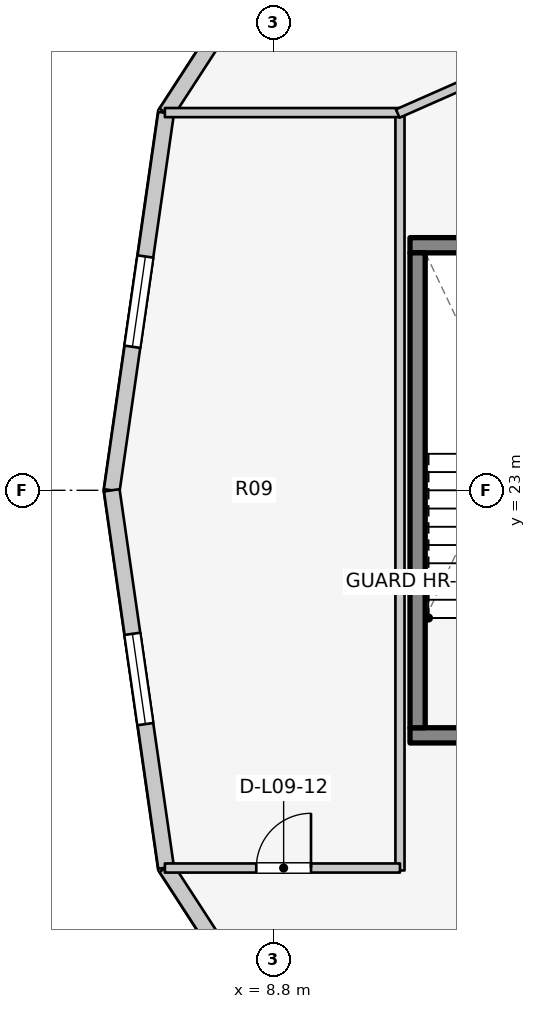
"""IFC4 building model, lengths in metres.
Left out: names, types, materials, properties, quantities, classifications, styles, units other than length and angle.
Written with IfcOpenShell. Run it as: python <this file> out.ifc"""

import sys

from ifc_helpers import new_model, si_unit, direction, frame, frame_2d, origin, place, context, subcontext, project, spatial, rectangle, extrude, element, fill, save


model = new_model("IFC4")
c1 = context("Model", 3, precision=1e-05, world=origin(), true_north=direction((0.0, 1.0)))
c2 = subcontext(c1, "Body", "Model", "MODEL_VIEW")
j1 = project(units=[si_unit("LENGTHUNIT", "METRE"), si_unit("PLANEANGLEUNIT", "RADIAN")], contexts=[c1])
p1 = place(None, origin())
s1 = spatial("IfcSite", under=j1, at=p1, CompositionType="ELEMENT")
p2 = place(p1, origin())
s2 = spatial("IfcBuilding", under=s1, at=p2, CompositionType="ELEMENT")
p3 = place(p2, frame((0.0, 0.0, 33.8)))
s3 = spatial("IfcBuildingStorey", under=s2, at=p3, CompositionType="ELEMENT", Elevation=33.8)
p4 = place(p3, frame((11.045, 18.97, 0.0), z_axis=(0.0, 0.0, 1.0), x_axis=(1.0, 0.0, 0.0)))
e1 = element("IfcWall", 1, at=p4, inside=s3, PredefinedType="SOLIDWALL", context=c2, shape_type="SweptSolid", body=[
    extrude(rectangle(XDim=3.782, YDim=0.25, at=frame_2d((1.891, 0.0))), origin(), (0.0, 0.0, 1.0), 3.1),
])
p5 = place(p4, frame((1.135, 0.0, 0.0)))
e2 = element("IfcOpeningElement", 2, at=p5, cuts=e1, PredefinedType="OPENING", context=c2, shape_type="SweptSolid", body=[
    extrude(rectangle(XDim=1.1, YDim=2.1, at=frame_2d((0.55, 1.05))), frame((0.0, 0.135, 0.0), z_axis=(0.0, -1.0, 0.0), x_axis=(1.0, 0.0, 0.0)), (0.0, 0.0, 1.0), 0.27),
])
p6 = place(p3, frame((11.045, 27.03, 0.0), z_axis=(0.0, 0.0, 1.0), x_axis=(1.0, 0.0, 0.0)))
e3 = element("IfcWall", 3, at=p6, inside=s3, PredefinedType="SOLIDWALL", context=c2, shape_type="SweptSolid", body=[
    extrude(rectangle(XDim=3.782, YDim=0.25, at=frame_2d((1.891, 0.0))), origin(), (0.0, 0.0, 1.0), 3.1),
])
p7 = place(p3, frame((11.17, 19.095, 0.0), z_axis=(0.0, 0.0, 1.0), x_axis=(0.0, 1.0, 0.0)))
e4 = element("IfcWall", 4, at=p7, inside=s3, PredefinedType="SOLIDWALL", context=c2, shape_type="SweptSolid", body=[
    extrude(rectangle(XDim=7.81, YDim=0.25, at=frame_2d((3.905, 0.0))), origin(), (0.0, 0.0, 1.0), 3.1),
])
p8 = place(p3, frame((9.806, 33.476, 0.0), z_axis=(0.0, 0.0, 1.0), x_axis=(-0.544578722263, -0.838709732421, 0.0)))
e5 = element("IfcWall", 5, at=p8, inside=s3, PredefinedType="STANDARD", context=c2, shape_type="SweptSolid", body=[
    extrude(rectangle(XDim=5.092, YDim=0.26, at=frame_2d((2.546, 0.0))), origin(), (0.0, 0.0, 1.0), 1.22),
])
p9 = place(p8, frame((1.946, 0.0, 0.15)))
e6 = element("IfcOpeningElement", 6, at=p9, cuts=e5, PredefinedType="OPENING", context=c2, shape_type="SweptSolid", body=[
    extrude(rectangle(XDim=1.2, YDim=0.9, at=frame_2d((0.6, 0.45))), frame((0.0, 0.14, 0.0), z_axis=(0.0, -1.0, 0.0), x_axis=(1.0, 0.0, 0.0)), (0.0, 0.0, 1.0), 0.28),
])
p10 = place(p3, frame((7.033, 29.205, 0.0), z_axis=(0.0, 0.0, 1.0), x_axis=(-0.142528001686, -0.989790770181, 0.0)))
e7 = element("IfcWall", 7, at=p10, inside=s3, PredefinedType="STANDARD", context=c2, shape_type="SweptSolid", body=[
    extrude(rectangle(XDim=6.269, YDim=0.26, at=frame_2d((3.135, 0.0))), origin(), (0.0, 0.0, 1.0), 2.57),
])
p11 = place(p10, frame((2.385, 0.0, 0.75)))
e8 = element("IfcOpeningElement", 8, at=p11, cuts=e7, PredefinedType="OPENING", context=c2, shape_type="SweptSolid", body=[
    extrude(rectangle(XDim=1.5, YDim=1.6, at=frame_2d((0.75, 0.8))), frame((0.0, 0.14, 0.0), z_axis=(0.0, -1.0, 0.0), x_axis=(1.0, 0.0, 0.0)), (0.0, 0.0, 1.0), 0.28),
])
p12 = place(p3, frame((6.14, 23.0, 0.0), z_axis=(0.0, 0.0, 1.0), x_axis=(0.142528001686, -0.989790770181, 0.0)))
e9 = element("IfcWall", 9, at=p12, inside=s3, PredefinedType="STANDARD", context=c2, shape_type="SweptSolid", body=[
    extrude(rectangle(XDim=6.269, YDim=0.26, at=frame_2d((3.135, 0.0))), origin(), (0.0, 0.0, 1.0), 2.57),
])
p13 = place(p12, frame((2.385, 0.0, 0.75)))
e10 = element("IfcOpeningElement", 10, at=p13, cuts=e9, PredefinedType="OPENING", context=c2, shape_type="SweptSolid", body=[
    extrude(rectangle(XDim=1.5, YDim=1.6, at=frame_2d((0.75, 0.8))), frame((0.0, 0.14, 0.0), z_axis=(0.0, -1.0, 0.0), x_axis=(1.0, 0.0, 0.0)), (0.0, 0.0, 1.0), 0.28),
])
p14 = place(p3, frame((7.033, 16.795, 0.0), z_axis=(0.0, 0.0, 1.0), x_axis=(0.544578722263, -0.838709732421, 0.0)))
e11 = element("IfcWall", 11, at=p14, inside=s3, PredefinedType="STANDARD", context=c2, shape_type="SweptSolid", body=[
    extrude(rectangle(XDim=5.092, YDim=0.26, at=frame_2d((2.546, 0.0))), origin(), (0.0, 0.0, 1.0), 1.22),
])
p15 = place(p14, frame((1.946, 0.0, 0.15)))
e12 = element("IfcOpeningElement", 12, at=p15, cuts=e11, PredefinedType="OPENING", context=c2, shape_type="SweptSolid", body=[
    extrude(rectangle(XDim=1.2, YDim=0.9, at=frame_2d((0.6, 0.45))), frame((0.0, 0.14, 0.0), z_axis=(0.0, -1.0, 0.0), x_axis=(1.0, 0.0, 0.0)), (0.0, 0.0, 1.0), 0.28),
])
p16 = place(p3, frame((10.88, 16.748, 0.0), z_axis=(0.0, 0.0, 1.0), x_axis=(0.0, 1.0, 0.0)))
e13 = element("IfcWall", 13, at=p16, inside=s3, PredefinedType="PARTITIONING", context=c2, shape_type="SweptSolid", body=[
    extrude(rectangle(XDim=12.503, YDim=0.15, at=frame_2d((6.252, 0.0))), origin(), (0.0, 0.0, 1.0), 2.12),
])
p17 = place(p3, frame((7.014, 16.788, 0.0), z_axis=(0.0, 0.0, 1.0), x_axis=(1.0, 0.0, 0.0)))
e14 = element("IfcWall", 14, at=p17, inside=s3, PredefinedType="PARTITIONING", context=c2, shape_type="SweptSolid", body=[
    extrude(rectangle(XDim=3.866, YDim=0.15, at=frame_2d((1.933, 0.0))), origin(), (0.0, 0.0, 1.0), 2.575),
])
p18 = place(p17, frame((1.503, 0.0, 0.0)))
e15 = element("IfcOpeningElement", 15, at=p18, cuts=e14, PredefinedType="OPENING", context=c2, shape_type="SweptSolid", body=[
    extrude(rectangle(XDim=0.9, YDim=2.1, at=frame_2d((0.45, 1.05))), frame((0.0, 0.085, 0.0), z_axis=(0.0, -1.0, 0.0), x_axis=(1.0, 0.0, 0.0)), (0.0, 0.0, 1.0), 0.17),
])
p19 = place(p3, frame((7.014, 29.212, 0.0), z_axis=(0.0, 0.0, 1.0), x_axis=(1.0, 0.0, 0.0)))
e16 = element("IfcWall", 16, at=p19, inside=s3, PredefinedType="PARTITIONING", context=c2, shape_type="SweptSolid", body=[
    extrude(rectangle(XDim=3.866, YDim=0.15, at=frame_2d((1.933, 0.0))), origin(), (0.0, 0.0, 1.0), 2.575),
])
p20 = place(p3, frame((10.844, 29.196, 0.0), z_axis=(0.0, 0.0, 1.0), x_axis=(0.91502756289, 0.403391322604, 0.0)))
e17 = element("IfcWall", 17, at=p20, inside=s3, PredefinedType="PARTITIONING", context=c2, shape_type="SweptSolid", body=[
    extrude(rectangle(XDim=4.637, YDim=0.15, at=frame_2d((2.319, 0.0))), origin(), (0.0, 0.0, 1.0), 1.22),
])
p21 = place(p11, origin())
e18 = element("IfcWindow", 18, at=p21, inside=s3, PartitioningType="SINGLE_PANEL", PredefinedType="WINDOW", context=c2, shape_type="SweptSolid", body=[
    extrude(rectangle(XDim=1.5, YDim=1.6, at=frame_2d((0.75, 0.8))), frame((0.0, 0.03, 0.0), z_axis=(0.0, -1.0, 0.0), x_axis=(1.0, 0.0, 0.0)), (0.0, 0.0, 1.0), 0.06),
])
fill(e8, e18)
p22 = place(p13, origin())
e19 = element("IfcWindow", 19, at=p22, inside=s3, PartitioningType="SINGLE_PANEL", PredefinedType="WINDOW", context=c2, shape_type="SweptSolid", body=[
    extrude(rectangle(XDim=1.5, YDim=1.6, at=frame_2d((0.75, 0.8))), frame((0.0, 0.03, 0.0), z_axis=(0.0, -1.0, 0.0), x_axis=(1.0, 0.0, 0.0)), (0.0, 0.0, 1.0), 0.06),
])
fill(e10, e19)
p23 = place(p18, origin())
e20 = element("IfcDoor", 20, at=p23, inside=s3, OperationType="SINGLE_SWING_RIGHT", PredefinedType="DOOR", context=c2, shape_type="SweptSolid", body=[
    extrude(rectangle(XDim=0.9, YDim=2.1, at=frame_2d((0.45, 1.05))), frame((0.0, 0.025, 0.0), z_axis=(0.0, -1.0, 0.0), x_axis=(1.0, 0.0, 0.0)), (0.0, 0.0, 1.0), 0.05),
])
fill(e15, e20)
save(model, sys.argv[1])
